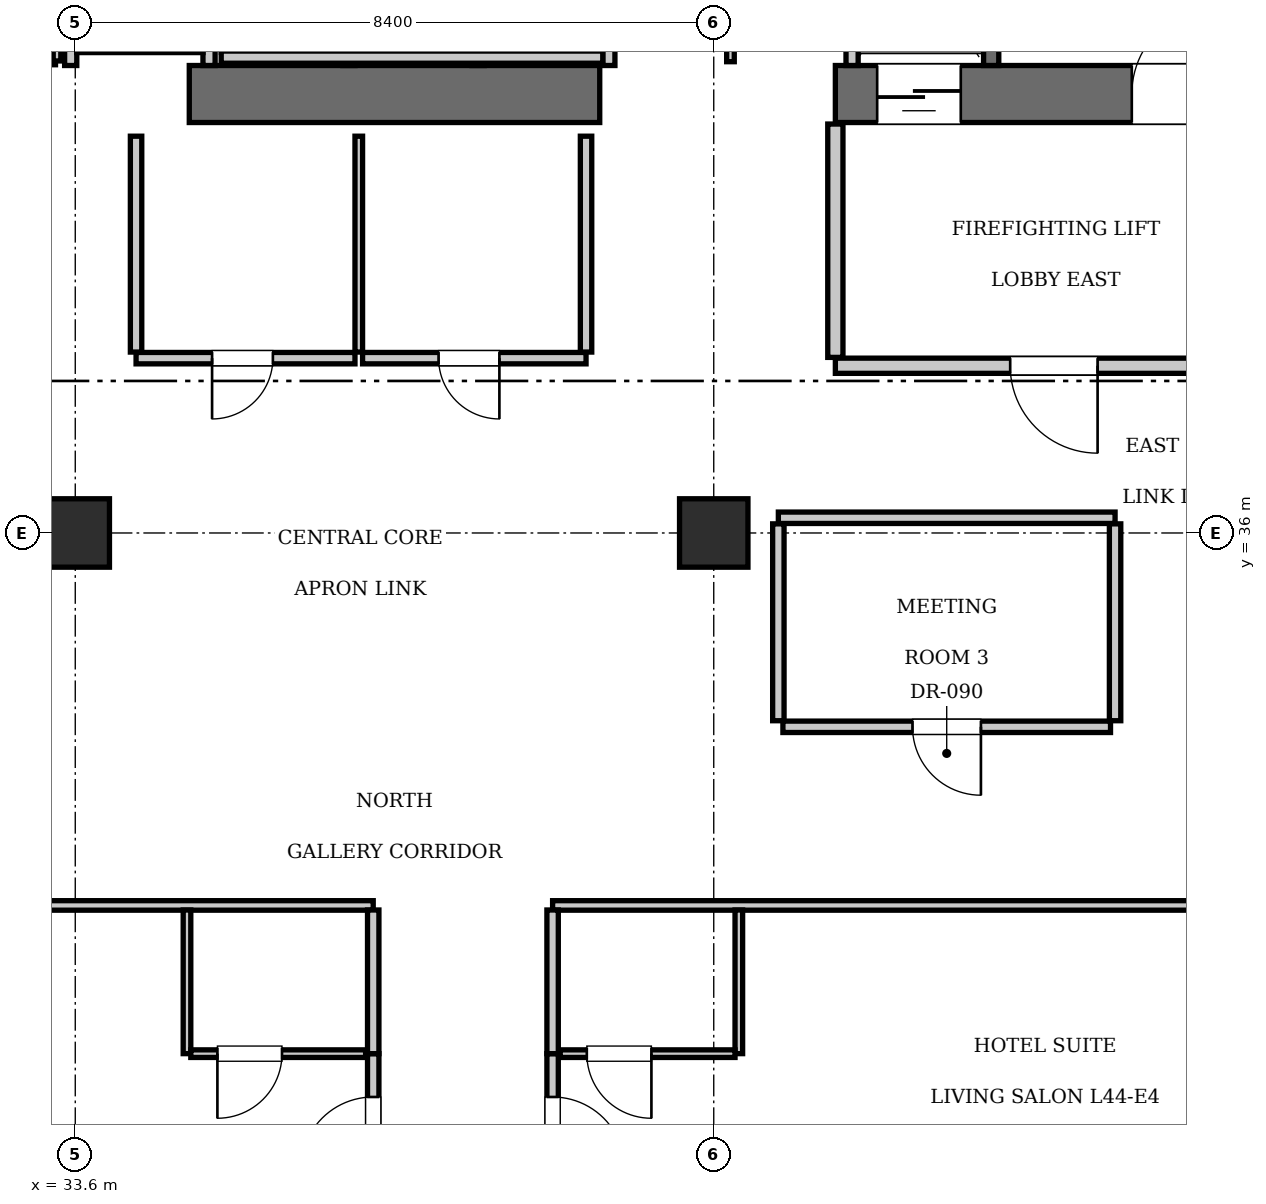
"""IFC4 building model, lengths in metres.
Left out: names, types, materials, properties, quantities, classifications, styles, units other than length and angle.
Written with IfcOpenShell. Run it as: python <this file> out.ifc"""

import sys

from ifc_helpers import new_model, si_unit, direction, frame, frame_2d, origin, origin_2d, place, context, subcontext, project, spatial, rectangle, extrude, element, fill, save


model = new_model("IFC4")
c1 = context("Model", 3, precision=1e-05, world=origin(), true_north=direction((0.0, 1.0)))
c2 = subcontext(c1, "Body", "Model", "MODEL_VIEW")
j1 = project(units=[si_unit("LENGTHUNIT", "METRE"), si_unit("PLANEANGLEUNIT", "RADIAN")], contexts=[c1])
p1 = place(None, origin())
s1 = spatial("IfcSite", under=j1, at=p1, CompositionType="ELEMENT")
p2 = place(p1, origin())
s2 = spatial("IfcBuilding", under=s1, at=p2, CompositionType="ELEMENT")
p3 = place(p2, frame((0.0, 0.0, 181.3)))
s3 = spatial("IfcBuildingStorey", under=s2, at=p3, CompositionType="ELEMENT", Elevation=181.3)
p4 = place(p3, frame((35.1, 41.775, 0.0), z_axis=(0.0, 0.0, 1.0), x_axis=(1.0, 0.0, 0.0)))
e1 = element("IfcWall", 1, at=p4, inside=s3, PredefinedType="SHEAR", context=c2, shape_type="SweptSolid", body=[
    extrude(rectangle(XDim=5.4, YDim=0.75, at=frame_2d((2.7, 0.0))), origin(), (0.0, 0.0, 1.0), 3.85),
])
p5 = place(p3, frame((43.6, 41.775, 0.0), z_axis=(0.0, 0.0, 1.0), x_axis=(1.0, 0.0, 0.0)))
e2 = element("IfcWall", 2, at=p5, inside=s3, PredefinedType="SHEAR", context=c2, shape_type="SweptSolid", body=[
    extrude(rectangle(XDim=6.8, YDim=0.75, at=frame_2d((3.4, 0.0))), origin(), (0.0, 0.0, 1.0), 3.85),
])
p6 = place(p5, frame((3.9, 0.0, 0.0)))
e3 = element("IfcOpeningElement", 3, at=p6, cuts=e2, PredefinedType="OPENING", context=c2, shape_type="SweptSolid", body=[
    extrude(rectangle(XDim=1.15, YDim=2.15, at=frame_2d((0.575, 1.075))), frame((0.0, 0.385, 0.0), z_axis=(0.0, -1.0, 0.0), x_axis=(1.0, 0.0, 0.0)), (0.0, 0.0, 1.0), 0.77),
])
p7 = place(p5, frame((0.55, 0.0, 0.0)))
e4 = element("IfcOpeningElement", 4, at=p7, cuts=e2, PredefinedType="OPENING", context=c2, shape_type="SweptSolid", body=[
    extrude(rectangle(XDim=1.1, YDim=2.2, at=frame_2d((0.55, 1.1))), frame((0.0, 0.385, 0.0), z_axis=(0.0, -1.0, 0.0), x_axis=(1.0, 0.0, 0.0)), (0.0, 0.0, 1.0), 0.77),
])
for number, where, z_axis, x_axis in (
    (5, (33.6, 36.0, 0.0), (0.0, 0.0, 1.0), (1.0, 0.0, 0.0)),
    (6, (42.0, 36.0, 0.0), (0.0, 0.0, 1.0), (1.0, 0.0, 0.0)),
):
    element("IfcColumn", number, at=place(p3, frame(where, z_axis=z_axis, x_axis=x_axis)), inside=s3, PredefinedType="COLUMN", context=c2, shape_type="SweptSolid", body=[
        extrude(rectangle(XDim=0.9, YDim=0.9, at=origin_2d()), origin(), (0.0, 0.0, 1.0), 3.85),
    ])
p8 = place(p3, frame((45.65, 42.15, 0.0), z_axis=(0.0, 0.0, 1.0), x_axis=(0.0, 1.0, 0.0)))
e7 = element("IfcWall", 7, at=p8, inside=s3, PredefinedType="SOLIDWALL", context=c2, shape_type="SweptSolid", body=[
    extrude(rectangle(XDim=9.0, YDim=0.2, at=frame_2d((4.5, 0.0))), origin(), (0.0, 0.0, 1.0), 3.61),
])
p9 = place(p3, frame((43.82, 42.15, 0.0), z_axis=(0.0, 0.0, 1.0), x_axis=(0.0, 1.0, 0.0)))
e8 = element("IfcWall", 8, at=p9, inside=s3, PredefinedType="SOLIDWALL", context=c2, shape_type="SweptSolid", body=[
    extrude(rectangle(XDim=2.59, YDim=0.16, at=frame_2d((1.295, 0.0))), origin(), (0.0, 0.0, 1.0), 3.61),
])
for number, where, z_axis, x_axis in (
    (9, (37.2, 42.15, 0.0), (0.0, 0.0, 1.0), (0.0, 1.0, 0.0)),
    (10, (38.9, 42.15, 0.0), (0.0, 0.0, 1.0), (0.0, 1.0, 0.0)),
    (11, (40.62, 42.15, 0.0), (0.0, 0.0, 1.0), (0.0, 1.0, 0.0)),
):
    element("IfcWall", number, at=place(p3, frame(where, z_axis=z_axis, x_axis=x_axis)), inside=s3, PredefinedType="SOLIDWALL", context=c2, shape_type="SweptSolid", body=[
        extrude(rectangle(XDim=2.2, YDim=0.16, at=frame_2d((1.1, 0.0))), origin(), (0.0, 0.0, 1.0), 3.61),
    ])
p10 = place(p3, frame((35.52, 42.26, 0.0), z_axis=(0.0, 0.0, 1.0), x_axis=(1.0, 0.0, 0.0)))
e12 = element("IfcWall", 12, at=p10, inside=s3, PredefinedType="SOLIDWALL", context=c2, shape_type="SweptSolid", body=[
    extrude(rectangle(XDim=5.02, YDim=0.16, at=frame_2d((2.51, 0.0))), origin(), (0.0, 0.0, 1.0), 3.61),
])
for number, where, z_axis, x_axis in (
    (13, (33.54, 42.15, 0.0), (0.0, 0.0, 1.0), (0.0, 1.0, 0.0)),
    (14, (35.36, 42.15, 0.0), (0.0, 0.0, 1.0), (0.0, 1.0, 0.0)),
):
    element("IfcWall", number, at=place(p3, frame(where, z_axis=z_axis, x_axis=x_axis)), inside=s3, PredefinedType="SOLIDWALL", context=c2, shape_type="SweptSolid", body=[
        extrude(rectangle(XDim=2.25, YDim=0.16, at=frame_2d((1.125, 0.0))), origin(), (0.0, 0.0, 1.0), 3.61),
    ])
p11 = place(p3, frame((33.62, 42.4, 0.0), z_axis=(0.0, 0.0, 1.0), x_axis=(1.0, 0.0, 0.0)))
e15 = element("IfcWall", 15, at=p11, inside=s3, PredefinedType="SOLIDWALL", context=c2, shape_type="SweptSolid", body=[
    extrude(rectangle(XDim=1.66, YDim=0.16, at=frame_2d((0.83, 0.0))), origin(), (0.0, 0.0, 1.0), 3.61),
])
p12 = place(p3, frame((43.6, 38.2, 0.0), z_axis=(0.0, 0.0, 1.0), x_axis=(1.0, 0.0, 0.0)))
e16 = element("IfcWall", 16, at=p12, inside=s3, PredefinedType="PARTITIONING", context=c2, shape_type="SweptSolid", body=[
    extrude(rectangle(XDim=5.8, YDim=0.2, at=frame_2d((2.9, 0.0))), origin(), (0.0, 0.0, 1.0), 3.61),
])
p13 = place(p12, frame((2.3, 0.0, 0.0)))
e17 = element("IfcOpeningElement", 17, at=p13, cuts=e16, PredefinedType="OPENING", context=c2, shape_type="SweptSolid", body=[
    extrude(rectangle(XDim=1.15, YDim=2.15, at=frame_2d((0.575, 1.075))), frame((0.0, 0.11, 0.0), z_axis=(0.0, -1.0, 0.0), x_axis=(1.0, 0.0, 0.0)), (0.0, 0.0, 1.0), 0.22),
])
p14 = place(p3, frame((43.6, 38.31, 0.0), z_axis=(0.0, 0.0, 1.0), x_axis=(0.0, 1.0, 0.0)))
e18 = element("IfcWall", 18, at=p14, inside=s3, PredefinedType="PARTITIONING", context=c2, shape_type="SweptSolid", body=[
    extrude(rectangle(XDim=3.07, YDim=0.2, at=frame_2d((1.535, 0.0))), origin(), (0.0, 0.0, 1.0), 3.61),
])
p15 = place(p3, frame((32.02, 42.21, 0.0), z_axis=(0.0, 0.0, 1.0), x_axis=(1.0, 0.0, 0.0)))
e19 = element("IfcWall", 19, at=p15, inside=s3, PredefinedType="PARTITIONING", context=c2, shape_type="SweptSolid", body=[
    extrude(rectangle(XDim=1.32, YDim=0.1, at=frame_2d((0.66, 0.0))), origin(), (0.0, 0.0, 1.0), 3.61),
])
p16 = place(p15, frame((0.24, 0.0, 0.0)))
e20 = element("IfcOpeningElement", 20, at=p16, cuts=e19, PredefinedType="OPENING", context=c2, shape_type="SweptSolid", body=[
    extrude(rectangle(XDim=0.8, YDim=2.05, at=frame_2d((0.4, 1.025))), frame((0.0, 0.06, 0.0), z_axis=(0.0, -1.0, 0.0), x_axis=(1.0, 0.0, 0.0)), (0.0, 0.0, 1.0), 0.12),
])
p17 = place(p3, frame((33.36, 42.21, 0.0), z_axis=(0.0, 0.0, 1.0), x_axis=(0.0, 1.0, 0.0)))
e21 = element("IfcWall", 21, at=p17, inside=s3, PredefinedType="PARTITIONING", context=c2, shape_type="SweptSolid", body=[
    extrude(rectangle(XDim=2.73, YDim=0.1, at=frame_2d((1.365, 0.0))), origin(), (0.0, 0.0, 1.0), 3.61),
])
p18 = place(p3, frame((42.22, 42.2, 0.0), z_axis=(0.0, 0.0, 1.0), x_axis=(0.0, 1.0, 0.0)))
e22 = element("IfcWall", 22, at=p18, inside=s3, PredefinedType="PARTITIONING", context=c2, shape_type="SweptSolid", body=[
    extrude(rectangle(XDim=2.76, YDim=0.1, at=frame_2d((1.38, 0.0))), origin(), (0.0, 0.0, 1.0), 3.61),
])
p19 = place(p18, frame((0.65, 0.0, 0.0)))
e23 = element("IfcOpeningElement", 23, at=p19, cuts=e22, PredefinedType="OPENING", context=c2, shape_type="SweptSolid", body=[
    extrude(rectangle(XDim=0.8, YDim=2.05, at=frame_2d((0.4, 1.025))), frame((0.0, 0.06, 0.0), z_axis=(0.0, -1.0, 0.0), x_axis=(1.0, 0.0, 0.0)), (0.0, 0.0, 1.0), 0.12),
])
p20 = place(p3, frame((34.4, 38.3, 0.0), z_axis=(0.0, 0.0, 1.0), x_axis=(1.0, 0.0, 0.0)))
e24 = element("IfcWall", 24, at=p20, inside=s3, PredefinedType="PARTITIONING", context=c2, shape_type="SweptSolid", body=[
    extrude(rectangle(XDim=2.88, YDim=0.15, at=frame_2d((1.44, 0.0))), origin(), (0.0, 0.0, 1.0), 3.61),
])
p21 = place(p20, frame((1.0, 0.0, 0.0)))
e25 = element("IfcOpeningElement", 25, at=p21, cuts=e24, PredefinedType="OPENING", context=c2, shape_type="SweptSolid", body=[
    extrude(rectangle(XDim=0.8, YDim=2.05, at=frame_2d((0.4, 1.025))), frame((0.0, 0.085, 0.0), z_axis=(0.0, -1.0, 0.0), x_axis=(1.0, 0.0, 0.0)), (0.0, 0.0, 1.0), 0.17),
])
p22 = place(p3, frame((37.38, 38.3, 0.0), z_axis=(0.0, 0.0, 1.0), x_axis=(1.0, 0.0, 0.0)))
e26 = element("IfcWall", 26, at=p22, inside=s3, PredefinedType="PARTITIONING", context=c2, shape_type="SweptSolid", body=[
    extrude(rectangle(XDim=2.94, YDim=0.15, at=frame_2d((1.47, 0.0))), origin(), (0.0, 0.0, 1.0), 3.61),
])
p23 = place(p22, frame((1.0, 0.0, 0.0)))
e27 = element("IfcOpeningElement", 27, at=p23, cuts=e26, PredefinedType="OPENING", context=c2, shape_type="SweptSolid", body=[
    extrude(rectangle(XDim=0.8, YDim=2.05, at=frame_2d((0.4, 1.025))), frame((0.0, 0.085, 0.0), z_axis=(0.0, -1.0, 0.0), x_axis=(1.0, 0.0, 0.0)), (0.0, 0.0, 1.0), 0.17),
])
p24 = place(p3, frame((34.4, 38.38, 0.0), z_axis=(0.0, 0.0, 1.0), x_axis=(0.0, 1.0, 0.0)))
e28 = element("IfcWall", 28, at=p24, inside=s3, PredefinedType="PARTITIONING", context=c2, shape_type="SweptSolid", body=[
    extrude(rectangle(XDim=2.84, YDim=0.15, at=frame_2d((1.42, 0.0))), origin(), (0.0, 0.0, 1.0), 3.61),
])
p25 = place(p3, frame((37.33, 38.38, 0.0), z_axis=(0.0, 0.0, 1.0), x_axis=(0.0, 1.0, 0.0)))
e29 = element("IfcWall", 29, at=p25, inside=s3, PredefinedType="PARTITIONING", context=c2, shape_type="SweptSolid", body=[
    extrude(rectangle(XDim=2.84, YDim=0.1, at=frame_2d((1.42, 0.0))), origin(), (0.0, 0.0, 1.0), 3.61),
])
p26 = place(p3, frame((40.32, 38.38, 0.0), z_axis=(0.0, 0.0, 1.0), x_axis=(0.0, 1.0, 0.0)))
e30 = element("IfcWall", 30, at=p26, inside=s3, PredefinedType="PARTITIONING", context=c2, shape_type="SweptSolid", body=[
    extrude(rectangle(XDim=2.84, YDim=0.15, at=frame_2d((1.42, 0.0))), origin(), (0.0, 0.0, 1.0), 3.61),
])
p27 = place(p3, frame((42.85, 36.2, 0.0), z_axis=(0.0, 0.0, 1.0), x_axis=(1.0, 0.0, 0.0)))
e31 = element("IfcWall", 31, at=p27, inside=s3, PredefinedType="PARTITIONING", context=c2, shape_type="SweptSolid", body=[
    extrude(rectangle(XDim=4.43, YDim=0.15, at=frame_2d((2.215, 0.0))), origin(), (0.0, 0.0, 1.0), 3.61),
])
for number, where, z_axis, x_axis in (
    (32, (42.85, 33.53, 0.0), (0.0, 0.0, 1.0), (0.0, 1.0, 0.0)),
    (33, (47.28, 33.53, 0.0), (0.0, 0.0, 1.0), (0.0, 1.0, 0.0)),
):
    element("IfcWall", number, at=place(p3, frame(where, z_axis=z_axis, x_axis=x_axis)), inside=s3, PredefinedType="PARTITIONING", context=c2, shape_type="SweptSolid", body=[
        extrude(rectangle(XDim=2.59, YDim=0.15, at=frame_2d((1.295, 0.0))), origin(), (0.0, 0.0, 1.0), 3.61),
    ])
p28 = place(p3, frame((42.91, 33.45, 0.0), z_axis=(0.0, 0.0, 1.0), x_axis=(1.0, 0.0, 0.0)))
e34 = element("IfcWall", 34, at=p28, inside=s3, PredefinedType="PARTITIONING", context=c2, shape_type="SweptSolid", body=[
    extrude(rectangle(XDim=4.31, YDim=0.15, at=frame_2d((2.155, 0.0))), origin(), (0.0, 0.0, 1.0), 3.61),
])
p29 = place(p28, frame((1.705, 0.0, 0.0)))
e35 = element("IfcOpeningElement", 35, at=p29, cuts=e34, PredefinedType="OPENING", context=c2, shape_type="SweptSolid", body=[
    extrude(rectangle(XDim=0.9, YDim=2.1, at=frame_2d((0.45, 1.05))), frame((0.0, 0.085, 0.0), z_axis=(0.0, -1.0, 0.0), x_axis=(1.0, 0.0, 0.0)), (0.0, 0.0, 1.0), 0.17),
])
p30 = place(p3, frame((13.2, 31.1, 0.0), z_axis=(0.0, 0.0, 1.0), x_axis=(1.0, 0.0, 0.0)))
e36 = element("IfcWall", 36, at=p30, inside=s3, PredefinedType="PARTITIONING", context=c2, shape_type="SweptSolid", body=[
    extrude(rectangle(XDim=24.32, YDim=0.125, at=frame_2d((12.16, 0.0))), origin(), (0.0, 0.0, 1.0), 3.61),
])
p31 = place(p3, frame((39.88, 31.1, 0.0), z_axis=(0.0, 0.0, 1.0), x_axis=(1.0, 0.0, 0.0)))
e37 = element("IfcWall", 37, at=p31, inside=s3, PredefinedType="PARTITIONING", context=c2, shape_type="SweptSolid", body=[
    extrude(rectangle(XDim=22.52, YDim=0.125, at=frame_2d((11.26, 0.0))), origin(), (0.0, 0.0, 1.0), 3.61),
])
p32 = place(p3, frame((37.52, 27.06, 0.0), z_axis=(0.0, 0.0, 1.0), x_axis=(0.0, 1.0, 0.0)))
e38 = element("IfcWall", 38, at=p32, inside=s3, PredefinedType="PARTITIONING", context=c2, shape_type="SweptSolid", body=[
    extrude(rectangle(XDim=2.09, YDim=0.15, at=frame_2d((1.045, 0.0))), origin(), (0.0, 0.0, 1.0), 3.61),
])
p33 = place(p32, frame((0.57, 0.0, 0.0)))
e39 = element("IfcOpeningElement", 39, at=p33, cuts=e38, PredefinedType="OPENING", context=c2, shape_type="SweptSolid", body=[
    extrude(rectangle(XDim=0.95, YDim=2.15, at=frame_2d((0.475, 1.075))), frame((0.0, 0.085, 0.0), z_axis=(0.0, -1.0, 0.0), x_axis=(1.0, 0.0, 0.0)), (0.0, 0.0, 1.0), 0.17),
])
p34 = place(p3, frame((37.52, 29.15, 0.0), z_axis=(0.0, 0.0, 1.0), x_axis=(0.0, 1.0, 0.0)))
e40 = element("IfcWall", 40, at=p34, inside=s3, PredefinedType="PARTITIONING", context=c2, shape_type="SweptSolid", body=[
    extrude(rectangle(XDim=1.89, YDim=0.15, at=frame_2d((0.945, 0.0))), origin(), (0.0, 0.0, 1.0), 3.61),
])
p35 = place(p3, frame((35.07, 29.15, 0.0), z_axis=(0.0, 0.0, 1.0), x_axis=(0.0, 1.0, 0.0)))
e41 = element("IfcWall", 41, at=p35, inside=s3, PredefinedType="PARTITIONING", context=c2, shape_type="SweptSolid", body=[
    extrude(rectangle(XDim=1.89, YDim=0.1, at=frame_2d((0.945, 0.0))), origin(), (0.0, 0.0, 1.0), 3.61),
])
p36 = place(p3, frame((35.12, 29.15, 0.0), z_axis=(0.0, 0.0, 1.0), x_axis=(1.0, 0.0, 0.0)))
e42 = element("IfcWall", 42, at=p36, inside=s3, PredefinedType="PARTITIONING", context=c2, shape_type="SweptSolid", body=[
    extrude(rectangle(XDim=2.3, YDim=0.1, at=frame_2d((1.15, 0.0))), origin(), (0.0, 0.0, 1.0), 3.61),
])
p37 = place(p36, frame((0.35, 0.0, 0.0)))
e43 = element("IfcOpeningElement", 43, at=p37, cuts=e42, PredefinedType="OPENING", context=c2, shape_type="SweptSolid", body=[
    extrude(rectangle(XDim=0.85, YDim=2.1, at=frame_2d((0.425, 1.05))), frame((0.0, 0.06, 0.0), z_axis=(0.0, -1.0, 0.0), x_axis=(1.0, 0.0, 0.0)), (0.0, 0.0, 1.0), 0.12),
])
p38 = place(p3, frame((39.88, 27.06, 0.0), z_axis=(0.0, 0.0, 1.0), x_axis=(0.0, 1.0, 0.0)))
e44 = element("IfcWall", 44, at=p38, inside=s3, PredefinedType="PARTITIONING", context=c2, shape_type="SweptSolid", body=[
    extrude(rectangle(XDim=2.09, YDim=0.15, at=frame_2d((1.045, 0.0))), origin(), (0.0, 0.0, 1.0), 3.61),
])
p39 = place(p38, frame((0.57, 0.0, 0.0)))
e45 = element("IfcOpeningElement", 45, at=p39, cuts=e44, PredefinedType="OPENING", context=c2, shape_type="SweptSolid", body=[
    extrude(rectangle(XDim=0.95, YDim=2.15, at=frame_2d((0.475, 1.075))), frame((0.0, 0.085, 0.0), z_axis=(0.0, -1.0, 0.0), x_axis=(1.0, 0.0, 0.0)), (0.0, 0.0, 1.0), 0.17),
])
p40 = place(p3, frame((39.88, 29.15, 0.0), z_axis=(0.0, 0.0, 1.0), x_axis=(0.0, 1.0, 0.0)))
e46 = element("IfcWall", 46, at=p40, inside=s3, PredefinedType="PARTITIONING", context=c2, shape_type="SweptSolid", body=[
    extrude(rectangle(XDim=1.89, YDim=0.15, at=frame_2d((0.945, 0.0))), origin(), (0.0, 0.0, 1.0), 3.61),
])
p41 = place(p3, frame((42.33, 29.15, 0.0), z_axis=(0.0, 0.0, 1.0), x_axis=(0.0, 1.0, 0.0)))
e47 = element("IfcWall", 47, at=p41, inside=s3, PredefinedType="PARTITIONING", context=c2, shape_type="SweptSolid", body=[
    extrude(rectangle(XDim=1.89, YDim=0.1, at=frame_2d((0.945, 0.0))), origin(), (0.0, 0.0, 1.0), 3.61),
])
p42 = place(p3, frame((39.98, 29.15, 0.0), z_axis=(0.0, 0.0, 1.0), x_axis=(1.0, 0.0, 0.0)))
e48 = element("IfcWall", 48, at=p42, inside=s3, PredefinedType="PARTITIONING", context=c2, shape_type="SweptSolid", body=[
    extrude(rectangle(XDim=2.3, YDim=0.1, at=frame_2d((1.15, 0.0))), origin(), (0.0, 0.0, 1.0), 3.61),
])
p43 = place(p42, frame((0.35, 0.0, 0.0)))
e49 = element("IfcOpeningElement", 49, at=p43, cuts=e48, PredefinedType="OPENING", context=c2, shape_type="SweptSolid", body=[
    extrude(rectangle(XDim=0.85, YDim=2.1, at=frame_2d((0.425, 1.05))), frame((0.0, 0.06, 0.0), z_axis=(0.0, -1.0, 0.0), x_axis=(1.0, 0.0, 0.0)), (0.0, 0.0, 1.0), 0.12),
])
p44 = place(p6, origin())
e50 = element("IfcDoor", 50, at=p44, inside=s3, OperationType="SINGLE_SWING_RIGHT", PredefinedType="DOOR", context=c2, shape_type="SweptSolid", body=[
    extrude(rectangle(XDim=1.15, YDim=2.15, at=frame_2d((0.575, 1.075))), frame((0.0, 0.025, 0.0), z_axis=(0.0, -1.0, 0.0), x_axis=(1.0, 0.0, 0.0)), (0.0, 0.0, 1.0), 0.05),
])
fill(e3, e50)
p45 = place(p7, frame((1.1, 0.0, 0.0), z_axis=(0.0, 0.0, 1.0), x_axis=(-1.0, 0.0, 0.0)))
e51 = element("IfcDoor", 51, at=p45, inside=s3, OperationType="SLIDING_TO_LEFT", PredefinedType="DOOR", context=c2, shape_type="SweptSolid", body=[
    extrude(rectangle(XDim=1.1, YDim=2.2, at=frame_2d((0.55, 1.1))), frame((0.0, 0.025, 0.0), z_axis=(0.0, -1.0, 0.0), x_axis=(1.0, 0.0, 0.0)), (0.0, 0.0, 1.0), 0.05),
])
fill(e4, e51)
p46 = place(p13, frame((1.15, 0.0, 0.0), z_axis=(0.0, 0.0, 1.0), x_axis=(-1.0, 0.0, 0.0)))
e52 = element("IfcDoor", 52, at=p46, inside=s3, OperationType="SINGLE_SWING_LEFT", PredefinedType="DOOR", context=c2, shape_type="SweptSolid", body=[
    extrude(rectangle(XDim=1.15, YDim=2.15, at=frame_2d((0.575, 1.075))), frame((0.0, 0.025, 0.0), z_axis=(0.0, -1.0, 0.0), x_axis=(1.0, 0.0, 0.0)), (0.0, 0.0, 1.0), 0.05),
])
fill(e17, e52)
p47 = place(p21, frame((0.8, 0.0, 0.0), z_axis=(0.0, 0.0, 1.0), x_axis=(-1.0, 0.0, 0.0)))
e53 = element("IfcDoor", 53, at=p47, inside=s3, OperationType="SINGLE_SWING_RIGHT", PredefinedType="DOOR", context=c2, shape_type="SweptSolid", body=[
    extrude(rectangle(XDim=0.8, YDim=2.05, at=frame_2d((0.4, 1.025))), frame((0.0, 0.025, 0.0), z_axis=(0.0, -1.0, 0.0), x_axis=(1.0, 0.0, 0.0)), (0.0, 0.0, 1.0), 0.05),
])
fill(e25, e53)
p48 = place(p23, frame((0.8, 0.0, 0.0), z_axis=(0.0, 0.0, 1.0), x_axis=(-1.0, 0.0, 0.0)))
e54 = element("IfcDoor", 54, at=p48, inside=s3, OperationType="SINGLE_SWING_LEFT", PredefinedType="DOOR", context=c2, shape_type="SweptSolid", body=[
    extrude(rectangle(XDim=0.8, YDim=2.05, at=frame_2d((0.4, 1.025))), frame((0.0, 0.025, 0.0), z_axis=(0.0, -1.0, 0.0), x_axis=(1.0, 0.0, 0.0)), (0.0, 0.0, 1.0), 0.05),
])
fill(e27, e54)
p49 = place(p29, frame((0.9, 0.0, 0.0), z_axis=(0.0, 0.0, 1.0), x_axis=(-1.0, 0.0, 0.0)))
e55 = element("IfcDoor", 55, at=p49, inside=s3, OperationType="SINGLE_SWING_LEFT", PredefinedType="DOOR", context=c2, shape_type="SweptSolid", body=[
    extrude(rectangle(XDim=0.9, YDim=2.1, at=frame_2d((0.45, 1.05))), frame((0.0, 0.025, 0.0), z_axis=(0.0, -1.0, 0.0), x_axis=(1.0, 0.0, 0.0)), (0.0, 0.0, 1.0), 0.05),
])
fill(e35, e55)
p50 = place(p37, frame((0.85, 0.0, 0.0), z_axis=(0.0, 0.0, 1.0), x_axis=(-1.0, 0.0, 0.0)))
e56 = element("IfcDoor", 56, at=p50, inside=s3, OperationType="SINGLE_SWING_RIGHT", PredefinedType="DOOR", context=c2, shape_type="SweptSolid", body=[
    extrude(rectangle(XDim=0.85, YDim=2.1, at=frame_2d((0.425, 1.05))), frame((0.0, 0.025, 0.0), z_axis=(0.0, -1.0, 0.0), x_axis=(1.0, 0.0, 0.0)), (0.0, 0.0, 1.0), 0.05),
])
fill(e43, e56)
p51 = place(p33, origin())
e57 = element("IfcDoor", 57, at=p51, inside=s3, OperationType="SINGLE_SWING_LEFT", PredefinedType="DOOR", context=c2, shape_type="SweptSolid", body=[
    extrude(rectangle(XDim=0.95, YDim=2.15, at=frame_2d((0.475, 1.075))), frame((0.0, 0.025, 0.0), z_axis=(0.0, -1.0, 0.0), x_axis=(1.0, 0.0, 0.0)), (0.0, 0.0, 1.0), 0.05),
])
fill(e39, e57)
p52 = place(p43, frame((0.85, 0.0, 0.0), z_axis=(0.0, 0.0, 1.0), x_axis=(-1.0, 0.0, 0.0)))
e58 = element("IfcDoor", 58, at=p52, inside=s3, OperationType="SINGLE_SWING_LEFT", PredefinedType="DOOR", context=c2, shape_type="SweptSolid", body=[
    extrude(rectangle(XDim=0.85, YDim=2.1, at=frame_2d((0.425, 1.05))), frame((0.0, 0.025, 0.0), z_axis=(0.0, -1.0, 0.0), x_axis=(1.0, 0.0, 0.0)), (0.0, 0.0, 1.0), 0.05),
])
fill(e49, e58)
p53 = place(p39, frame((0.95, 0.0, 0.0), z_axis=(0.0, 0.0, 1.0), x_axis=(-1.0, 0.0, 0.0)))
e59 = element("IfcDoor", 59, at=p53, inside=s3, OperationType="SINGLE_SWING_RIGHT", PredefinedType="DOOR", context=c2, shape_type="SweptSolid", body=[
    extrude(rectangle(XDim=0.95, YDim=2.15, at=frame_2d((0.475, 1.075))), frame((0.0, 0.025, 0.0), z_axis=(0.0, -1.0, 0.0), x_axis=(1.0, 0.0, 0.0)), (0.0, 0.0, 1.0), 0.05),
])
fill(e45, e59)
save(model, sys.argv[1])
